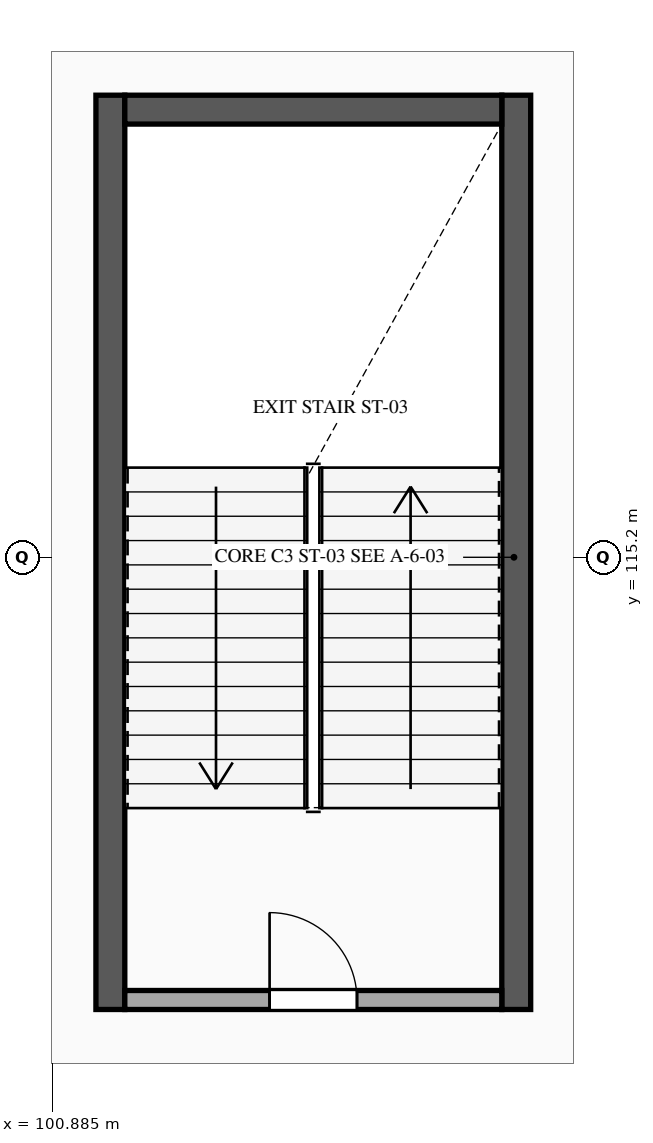
"""IFC4 building model, lengths in metres.
Left out: names, types, materials, properties, quantities, classifications, styles, units other than length and angle.
Written with IfcOpenShell. Run it as: python <this file> out.ifc"""

import sys

from ifc_helpers import new_model, si_unit, direction, frame, frame_2d, origin, place, context, subcontext, project, spatial, rectangle, extrude, element, fill, save


model = new_model("IFC4")
c1 = context("Model", 3, precision=1e-05, world=origin(), true_north=direction((0.0, 1.0)))
c2 = subcontext(c1, "Body", "Model", "MODEL_VIEW")
j1 = project(units=[si_unit("LENGTHUNIT", "METRE"), si_unit("PLANEANGLEUNIT", "RADIAN")], contexts=[c1])
p1 = place(None, origin())
s1 = spatial("IfcSite", under=j1, at=p1, CompositionType="ELEMENT")
p2 = place(p1, origin())
s2 = spatial("IfcBuilding", under=s1, at=p2, CompositionType="ELEMENT")
p3 = place(p2, frame((0.0, 0.0, 15.3)))
s3 = spatial("IfcBuildingStorey", under=s2, at=p3, CompositionType="ELEMENT", Elevation=15.3)
for number, where, z_axis, x_axis in (
    (1, (101.65, 109.25, 0.0), (0.0, 0.0, 1.0), (0.0, 1.0, 0.0)),
    (2, (106.99, 121.28, 0.0), (0.0, 0.0, 1.0), (0.0, -1.0, 0.0)),
):
    element("IfcWall", number, at=place(p3, frame(where, z_axis=z_axis, x_axis=x_axis)), inside=s3, PredefinedType="SHEAR", context=c2, shape_type="SweptSolid", body=[
        extrude(rectangle(XDim=12.03, YDim=0.38, at=frame_2d((6.015, 0.0))), origin(), (0.0, 0.0, 1.0), 4.25),
    ])
p4 = place(p3, frame((101.84, 121.09, 0.0), z_axis=(0.0, 0.0, 1.0), x_axis=(1.0, 0.0, 0.0)))
e3 = element("IfcWall", 3, at=p4, inside=s3, PredefinedType="SHEAR", context=c2, shape_type="SweptSolid", body=[
    extrude(rectangle(XDim=4.96, YDim=0.38, at=frame_2d((2.48, 0.0))), origin(), (0.0, 0.0, 1.0), 4.25),
])
p5 = place(p3, frame((101.84, 109.375, 0.0), z_axis=(0.0, 0.0, 1.0), x_axis=(1.0, 0.0, 0.0)))
e4 = element("IfcWall", 4, at=p5, inside=s3, PredefinedType="STANDARD", context=c2, shape_type="SweptSolid", body=[
    extrude(rectangle(XDim=4.96, YDim=0.25, at=frame_2d((2.48, 0.0))), origin(), (0.0, 0.0, 1.0), 4.25),
])
p6 = place(p5, frame((1.905, 0.0, 0.0)))
e5 = element("IfcOpeningElement", 5, at=p6, cuts=e4, PredefinedType="OPENING", context=c2, shape_type="SweptSolid", body=[
    extrude(rectangle(XDim=1.15, YDim=2.2, at=frame_2d((0.575, 1.1))), frame((0.0, 0.135, 0.0), z_axis=(0.0, -1.0, 0.0), x_axis=(1.0, 0.0, 0.0)), (0.0, 0.0, 1.0), 0.27),
])
p7 = place(p6, origin())
e6 = element("IfcDoor", 6, at=p7, inside=s3, OperationType="SINGLE_SWING_LEFT", PredefinedType="DOOR", context=c2, shape_type="SweptSolid", body=[
    extrude(rectangle(XDim=1.15, YDim=2.2, at=frame_2d((0.575, 1.1))), frame((0.0, 0.025, 0.0), z_axis=(0.0, -1.0, 0.0), x_axis=(1.0, 0.0, 0.0)), (0.0, 0.0, 1.0), 0.05),
])
fill(e5, e6)
save(model, sys.argv[1])
